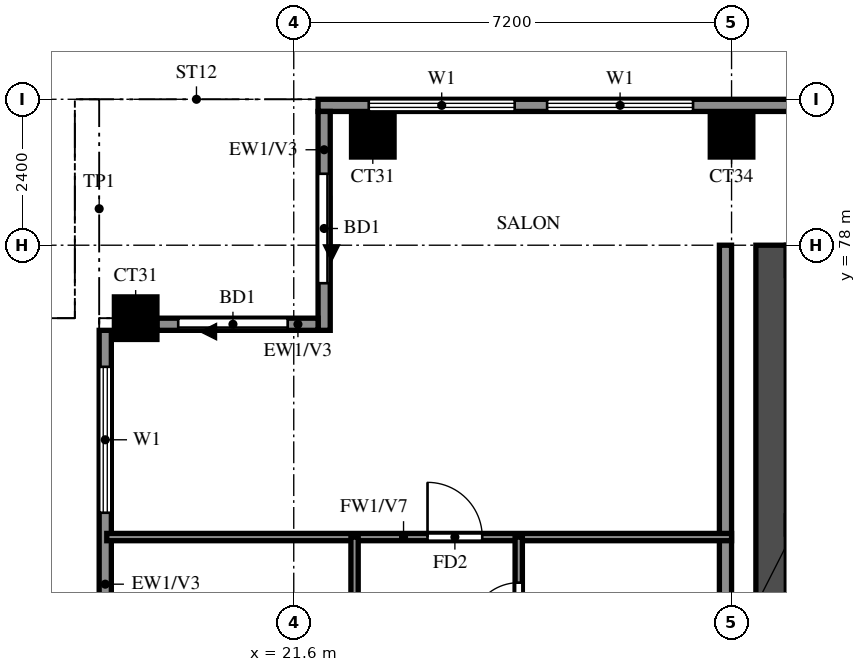
"""IFC4 building model, lengths in metres.
Left out: names, types, materials, properties, quantities, classifications, styles, units other than length and angle.
Written with IfcOpenShell. Run it as: python <this file> out.ifc"""

import sys

from ifc_helpers import new_model, si_unit, direction, frame, frame_2d, origin, origin_2d, place, context, subcontext, project, spatial, rectangle, extrude, source, transform, mapped, element, fill, save


model = new_model("IFC4")
c1 = context("Model", 3, precision=1e-05, world=origin(), true_north=direction((0.0, 1.0)))
c2 = subcontext(c1, "Body", "Model", "MODEL_VIEW")
j1 = project(units=[si_unit("LENGTHUNIT", "METRE"), si_unit("PLANEANGLEUNIT", "RADIAN")], contexts=[c1])
p1 = place(None, origin())
s1 = spatial("IfcSite", under=j1, at=p1, CompositionType="ELEMENT")
p2 = place(p1, origin())
s2 = spatial("IfcBuilding", under=s1, at=p2, CompositionType="ELEMENT")
p3 = place(p2, frame((0.0, 0.0, 211.5)))
s3 = spatial("IfcBuildingStorey", under=s2, at=p3, CompositionType="ELEMENT", Elevation=211.5)
m1 = source(origin(), c2, "Body", "SweptSolid", [
    extrude(rectangle(XDim=0.7, YDim=0.7, at=origin_2d()), origin(), (0.0, 0.0, 1.0), 3.5),
])
for number, where, z_axis, x_axis in (
    (1, (19.0, 76.8, -0.28), (0.0, 0.0, 1.0), (1.0, 0.0, 0.0)),
    (2, (22.9, 79.8, -0.28), (0.0, 0.0, 1.0), (1.0, 0.0, 0.0)),
):
    element("IfcColumn", number, at=place(p3, frame(where, z_axis=z_axis, x_axis=x_axis)), inside=s3, PredefinedType="COLUMN", context=c2, shape_type="MappedRepresentation", body=[
        mapped(m1, transform((0.0, 0.0, 0.0))),
    ])
m2 = source(origin(), c2, "Body", "SweptSolid", [
    extrude(rectangle(XDim=0.7, YDim=0.7, at=origin_2d()), origin(), (0.0, 0.0, 1.0), 3.22),
])
p4 = place(p3, frame((28.8, 79.8, 0.0), z_axis=(0.0, 0.0, 1.0), x_axis=(1.0, 0.0, 0.0)))
e3 = element("IfcColumn", 3, at=p4, inside=s3, PredefinedType="COLUMN", context=c2, shape_type="MappedRepresentation", body=[
    mapped(m2, transform((0.0, 0.0, 0.0))),
])
p5 = place(p3, frame((29.45, 66.15, 0.0), z_axis=(0.0, 0.0, 1.0), x_axis=(0.0, 1.0, 0.0)))
e4 = element("IfcWall", 4, at=p5, inside=s3, PredefinedType="SHEAR", context=c2, shape_type="SweptSolid", body=[
    extrude(rectangle(XDim=11.85, YDim=0.5, at=frame_2d((5.925, 0.0))), origin(), (0.0, 0.0, 1.0), 3.22),
])
p6 = place(p3, frame((78.6, 80.3, 0.0), z_axis=(0.0, 0.0, 1.0), x_axis=(-1.0, 0.0, 0.0)))
e5 = element("IfcWall", 5, at=p6, inside=s3, PredefinedType="SOLIDWALL", context=c2, shape_type="SweptSolid", body=[
    extrude(rectangle(XDim=56.6, YDim=0.2, at=frame_2d((28.3, 0.0))), origin(), (0.0, 0.0, 1.0), 3.22),
])
p7 = place(p6, frame((50.433, 0.0, 0.6)))
e6 = element("IfcOpeningElement", 6, at=p7, cuts=e5, PredefinedType="OPENING", context=c2, shape_type="SweptSolid", body=[
    extrude(rectangle(XDim=2.4, YDim=2.4, at=frame_2d((1.2, 1.2))), frame((0.0, 0.11, 0.0), z_axis=(0.0, -1.0, 0.0), x_axis=(1.0, 0.0, 0.0)), (0.0, 0.0, 1.0), 0.22),
])
p8 = place(p6, frame((53.367, 0.0, 0.6)))
e7 = element("IfcOpeningElement", 7, at=p8, cuts=e5, PredefinedType="OPENING", context=c2, shape_type="SweptSolid", body=[
    extrude(rectangle(XDim=2.4, YDim=2.4, at=frame_2d((1.2, 1.2))), frame((0.0, 0.11, 0.0), z_axis=(0.0, -1.0, 0.0), x_axis=(1.0, 0.0, 0.0)), (0.0, 0.0, 1.0), 0.22),
])
p9 = place(p6, frame((0.767, 0.0, 0.6)))
e8 = element("IfcOpeningElement", 8, at=p9, cuts=e5, PredefinedType="OPENING", context=c2, shape_type="SweptSolid", body=[
    extrude(rectangle(XDim=2.4, YDim=2.4, at=frame_2d((1.2, 1.2))), frame((0.0, 0.11, 0.0), z_axis=(0.0, -1.0, 0.0), x_axis=(1.0, 0.0, 0.0)), (0.0, 0.0, 1.0), 0.22),
])
p10 = place(p6, frame((3.633, 0.0, 0.6)))
e9 = element("IfcOpeningElement", 9, at=p10, cuts=e5, PredefinedType="OPENING", context=c2, shape_type="SweptSolid", body=[
    extrude(rectangle(XDim=2.4, YDim=2.4, at=frame_2d((1.2, 1.2))), frame((0.0, 0.11, 0.0), z_axis=(0.0, -1.0, 0.0), x_axis=(1.0, 0.0, 0.0)), (0.0, 0.0, 1.0), 0.22),
])
p11 = place(p3, frame((22.1, 80.2, 0.0), z_axis=(0.0, 0.0, 1.0), x_axis=(0.0, -1.0, 0.0)))
e10 = element("IfcWall", 10, at=p11, inside=s3, PredefinedType="SOLIDWALL", context=c2, shape_type="SweptSolid", body=[
    extrude(rectangle(XDim=3.6, YDim=0.2, at=frame_2d((1.8, 0.0))), origin(), (0.0, 0.0, 1.0), 3.22),
])
p12 = place(p11, frame((1.025, 0.0, 0.0)))
e11 = element("IfcOpeningElement", 11, at=p12, cuts=e10, PredefinedType="OPENING", context=c2, shape_type="SweptSolid", body=[
    extrude(rectangle(XDim=1.8, YDim=2.4, at=frame_2d((0.9, 1.2))), frame((0.0, 0.11, 0.0), z_axis=(0.0, -1.0, 0.0), x_axis=(1.0, 0.0, 0.0)), (0.0, 0.0, 1.0), 0.22),
])
p13 = place(p3, frame((22.0, 76.7, 0.0), z_axis=(0.0, 0.0, 1.0), x_axis=(-1.0, 0.0, 0.0)))
e12 = element("IfcWall", 12, at=p13, inside=s3, PredefinedType="SOLIDWALL", context=c2, shape_type="SweptSolid", body=[
    extrude(rectangle(XDim=2.65, YDim=0.2, at=frame_2d((1.325, 0.0))), origin(), (0.0, 0.0, 1.0), 3.22),
])
p14 = place(p13, frame((0.5, 0.0, 0.0)))
e13 = element("IfcOpeningElement", 13, at=p14, cuts=e12, PredefinedType="OPENING", context=c2, shape_type="SweptSolid", body=[
    extrude(rectangle(XDim=1.8, YDim=2.4, at=frame_2d((0.9, 1.2))), frame((0.0, 0.11, 0.0), z_axis=(0.0, -1.0, 0.0), x_axis=(1.0, 0.0, 0.0)), (0.0, 0.0, 1.0), 0.22),
])
p15 = place(p3, frame((18.5, 76.6, 0.0), z_axis=(0.0, 0.0, 1.0), x_axis=(0.0, -1.0, 0.0)))
e14 = element("IfcWall", 14, at=p15, inside=s3, PredefinedType="SOLIDWALL", context=c2, shape_type="SweptSolid", body=[
    extrude(rectangle(XDim=33.4, YDim=0.2, at=frame_2d((16.7, 0.0))), origin(), (0.0, 0.0, 1.0), 3.22),
])
p16 = place(p15, frame((30.037, 0.0, 0.0)))
e15 = element("IfcOpeningElement", 15, at=p16, cuts=e14, PredefinedType="OPENING", context=c2, shape_type="SweptSolid", body=[
    extrude(rectangle(XDim=1.8, YDim=2.4, at=frame_2d((0.9, 1.2))), frame((0.0, 0.11, 0.0), z_axis=(0.0, -1.0, 0.0), x_axis=(1.0, 0.0, 0.0)), (0.0, 0.0, 1.0), 0.22),
])
p17 = place(p15, frame((28.719, 0.0, 0.6)))
e16 = element("IfcOpeningElement", 16, at=p17, cuts=e14, PredefinedType="OPENING", context=c2, shape_type="SweptSolid", body=[
    extrude(rectangle(XDim=0.9, YDim=2.4, at=frame_2d((0.45, 1.2))), frame((0.0, 0.11, 0.0), z_axis=(0.0, -1.0, 0.0), x_axis=(1.0, 0.0, 0.0)), (0.0, 0.0, 1.0), 0.22),
])
p18 = place(p15, frame((25.6, 0.0, 0.6)))
e17 = element("IfcOpeningElement", 17, at=p18, cuts=e14, PredefinedType="OPENING", context=c2, shape_type="SweptSolid", body=[
    extrude(rectangle(XDim=2.4, YDim=2.4, at=frame_2d((1.2, 1.2))), frame((0.0, 0.11, 0.0), z_axis=(0.0, -1.0, 0.0), x_axis=(1.0, 0.0, 0.0)), (0.0, 0.0, 1.0), 0.22),
])
p19 = place(p15, frame((22.0, 0.0, 0.6)))
e18 = element("IfcOpeningElement", 18, at=p19, cuts=e14, PredefinedType="OPENING", context=c2, shape_type="SweptSolid", body=[
    extrude(rectangle(XDim=2.4, YDim=2.4, at=frame_2d((1.2, 1.2))), frame((0.0, 0.11, 0.0), z_axis=(0.0, -1.0, 0.0), x_axis=(1.0, 0.0, 0.0)), (0.0, 0.0, 1.0), 0.22),
])
p20 = place(p15, frame((18.4, 0.0, 0.6)))
e19 = element("IfcOpeningElement", 19, at=p20, cuts=e14, PredefinedType="OPENING", context=c2, shape_type="SweptSolid", body=[
    extrude(rectangle(XDim=2.4, YDim=2.4, at=frame_2d((1.2, 1.2))), frame((0.0, 0.11, 0.0), z_axis=(0.0, -1.0, 0.0), x_axis=(1.0, 0.0, 0.0)), (0.0, 0.0, 1.0), 0.22),
])
p21 = place(p15, frame((14.8, 0.0, 0.6)))
e20 = element("IfcOpeningElement", 20, at=p21, cuts=e14, PredefinedType="OPENING", context=c2, shape_type="SweptSolid", body=[
    extrude(rectangle(XDim=2.4, YDim=2.4, at=frame_2d((1.2, 1.2))), frame((0.0, 0.11, 0.0), z_axis=(0.0, -1.0, 0.0), x_axis=(1.0, 0.0, 0.0)), (0.0, 0.0, 1.0), 0.22),
])
p22 = place(p15, frame((7.833, 0.0, 0.6)))
e21 = element("IfcOpeningElement", 21, at=p22, cuts=e14, PredefinedType="OPENING", context=c2, shape_type="SweptSolid", body=[
    extrude(rectangle(XDim=2.4, YDim=2.4, at=frame_2d((1.2, 1.2))), frame((0.0, 0.11, 0.0), z_axis=(0.0, -1.0, 0.0), x_axis=(1.0, 0.0, 0.0)), (0.0, 0.0, 1.0), 0.22),
])
p23 = place(p15, frame((10.967, 0.0, 0.6)))
e22 = element("IfcOpeningElement", 22, at=p23, cuts=e14, PredefinedType="OPENING", context=c2, shape_type="SweptSolid", body=[
    extrude(rectangle(XDim=2.4, YDim=2.4, at=frame_2d((1.2, 1.2))), frame((0.0, 0.11, 0.0), z_axis=(0.0, -1.0, 0.0), x_axis=(1.0, 0.0, 0.0)), (0.0, 0.0, 1.0), 0.22),
])
p24 = place(p15, frame((4.75, 0.0, 1.5)))
e23 = element("IfcOpeningElement", 23, at=p24, cuts=e14, PredefinedType="OPENING", context=c2, shape_type="SweptSolid", body=[
    extrude(rectangle(XDim=0.9, YDim=0.9, at=frame_2d((0.45, 0.45))), frame((0.0, 0.11, 0.0), z_axis=(0.0, -1.0, 0.0), x_axis=(1.0, 0.0, 0.0)), (0.0, 0.0, 1.0), 0.22),
])
p25 = place(p15, frame((0.6, 0.0, 0.6)))
e24 = element("IfcOpeningElement", 24, at=p25, cuts=e14, PredefinedType="OPENING", context=c2, shape_type="SweptSolid", body=[
    extrude(rectangle(XDim=2.4, YDim=2.4, at=frame_2d((1.2, 1.2))), frame((0.0, 0.11, 0.0), z_axis=(0.0, -1.0, 0.0), x_axis=(1.0, 0.0, 0.0)), (0.0, 0.0, 1.0), 0.22),
])
p26 = place(p3, frame((28.7, 62.4, 0.0), z_axis=(0.0, 0.0, 1.0), x_axis=(0.0, 1.0, 0.0)))
e25 = element("IfcWall", 25, at=p26, inside=s3, PredefinedType="SOLIDWALL", context=c2, shape_type="SweptSolid", body=[
    extrude(rectangle(XDim=15.6, YDim=0.2, at=frame_2d((7.8, 0.0))), origin(), (0.0, 0.0, 1.0), 3.22),
])
p27 = place(p3, frame((18.525, 73.2, 0.0), z_axis=(0.0, 0.0, 1.0), x_axis=(1.0, 0.0, 0.0)))
e26 = element("IfcWall", 26, at=p27, inside=s3, PredefinedType="PARTITIONING", context=c2, shape_type="SweptSolid", body=[
    extrude(rectangle(XDim=10.275, YDim=0.12, at=frame_2d((5.138, 0.0))), origin(), (0.0, 0.0, 1.0), 2.32),
])
p28 = place(p27, frame((5.275, 0.0, 0.0)))
e27 = element("IfcOpeningElement", 27, at=p28, cuts=e26, PredefinedType="OPENING", context=c2, shape_type="SweptSolid", body=[
    extrude(rectangle(XDim=0.9, YDim=2.1, at=frame_2d((0.45, 1.05))), frame((0.0, 0.07, 0.0), z_axis=(0.0, -1.0, 0.0), x_axis=(1.0, 0.0, 0.0)), (0.0, 0.0, 1.0), 0.14),
])
p29 = place(p3, frame((22.6, 69.6, 0.0), z_axis=(0.0, 0.0, 1.0), x_axis=(0.0, 1.0, 0.0)))
e28 = element("IfcWall", 28, at=p29, inside=s3, PredefinedType="PARTITIONING", context=c2, shape_type="SweptSolid", body=[
    extrude(rectangle(XDim=3.6, YDim=0.12, at=frame_2d((1.8, 0.0))), origin(), (0.0, 0.0, 1.0), 3.22),
])
p30 = place(p3, frame((25.3, 61.2, 0.0), z_axis=(0.0, 0.0, 1.0), x_axis=(0.0, 1.0, 0.0)))
e29 = element("IfcWall", 29, at=p30, inside=s3, PredefinedType="PARTITIONING", context=c2, shape_type="SweptSolid", body=[
    extrude(rectangle(XDim=12.0, YDim=0.12, at=frame_2d((6.0, 0.0))), origin(), (0.0, 0.0, 1.0), 3.22),
])
p31 = place(p30, frame((4.2, 0.0, 0.0)))
e30 = element("IfcOpeningElement", 30, at=p31, cuts=e29, PredefinedType="OPENING", context=c2, shape_type="SweptSolid", body=[
    extrude(rectangle(XDim=0.9, YDim=2.1, at=frame_2d((0.45, 1.05))), frame((0.0, 0.07, 0.0), z_axis=(0.0, -1.0, 0.0), x_axis=(1.0, 0.0, 0.0)), (0.0, 0.0, 1.0), 0.14),
])
p32 = place(p30, frame((7.975, 0.0, 0.0)))
e31 = element("IfcOpeningElement", 31, at=p32, cuts=e29, PredefinedType="OPENING", context=c2, shape_type="SweptSolid", body=[
    extrude(rectangle(XDim=0.8, YDim=2.1, at=frame_2d((0.4, 1.05))), frame((0.0, 0.07, 0.0), z_axis=(0.0, -1.0, 0.0), x_axis=(1.0, 0.0, 0.0)), (0.0, 0.0, 1.0), 0.14),
])
p33 = place(p30, frame((10.45, 0.0, 0.0)))
e32 = element("IfcOpeningElement", 32, at=p33, cuts=e29, PredefinedType="OPENING", context=c2, shape_type="SweptSolid", body=[
    extrude(rectangle(XDim=0.8, YDim=2.1, at=frame_2d((0.4, 1.05))), frame((0.0, 0.07, 0.0), z_axis=(0.0, -1.0, 0.0), x_axis=(1.0, 0.0, 0.0)), (0.0, 0.0, 1.0), 0.14),
])
p34 = place(p7, origin())
e33 = element("IfcWindow", 33, at=p34, inside=s3, PartitioningType="DOUBLE_PANEL_VERTICAL", PredefinedType="WINDOW", context=c2, shape_type="SweptSolid", body=[
    extrude(rectangle(XDim=2.4, YDim=2.4, at=frame_2d((1.2, 1.2))), frame((0.0, 0.03, 0.0), z_axis=(0.0, -1.0, 0.0), x_axis=(1.0, 0.0, 0.0)), (0.0, 0.0, 1.0), 0.06),
])
fill(e6, e33)
p35 = place(p8, origin())
e34 = element("IfcWindow", 34, at=p35, inside=s3, PartitioningType="DOUBLE_PANEL_VERTICAL", PredefinedType="WINDOW", context=c2, shape_type="SweptSolid", body=[
    extrude(rectangle(XDim=2.4, YDim=2.4, at=frame_2d((1.2, 1.2))), frame((0.0, 0.03, 0.0), z_axis=(0.0, -1.0, 0.0), x_axis=(1.0, 0.0, 0.0)), (0.0, 0.0, 1.0), 0.06),
])
fill(e7, e34)
p36 = place(p12, origin())
e35 = element("IfcDoor", 35, at=p36, inside=s3, OperationType="DOUBLE_DOOR_SLIDING", PredefinedType="DOOR", context=c2, shape_type="SweptSolid", body=[
    extrude(rectangle(XDim=1.8, YDim=2.4, at=frame_2d((0.9, 1.2))), frame((0.0, 0.025, 0.0), z_axis=(0.0, -1.0, 0.0), x_axis=(1.0, 0.0, 0.0)), (0.0, 0.0, 1.0), 0.05),
])
fill(e11, e35)
p37 = place(p14, origin())
e36 = element("IfcDoor", 36, at=p37, inside=s3, OperationType="DOUBLE_DOOR_SLIDING", PredefinedType="DOOR", context=c2, shape_type="SweptSolid", body=[
    extrude(rectangle(XDim=1.8, YDim=2.4, at=frame_2d((0.9, 1.2))), frame((0.0, 0.025, 0.0), z_axis=(0.0, -1.0, 0.0), x_axis=(1.0, 0.0, 0.0)), (0.0, 0.0, 1.0), 0.05),
])
fill(e13, e36)
p38 = place(p25, origin())
e37 = element("IfcWindow", 37, at=p38, inside=s3, PartitioningType="DOUBLE_PANEL_VERTICAL", PredefinedType="WINDOW", context=c2, shape_type="SweptSolid", body=[
    extrude(rectangle(XDim=2.4, YDim=2.4, at=frame_2d((1.2, 1.2))), frame((0.0, 0.03, 0.0), z_axis=(0.0, -1.0, 0.0), x_axis=(1.0, 0.0, 0.0)), (0.0, 0.0, 1.0), 0.06),
])
fill(e24, e37)
p39 = place(p28, origin())
e38 = element("IfcDoor", 38, at=p39, inside=s3, OperationType="SINGLE_SWING_LEFT", PredefinedType="DOOR", context=c2, shape_type="SweptSolid", body=[
    extrude(rectangle(XDim=0.9, YDim=2.1, at=frame_2d((0.45, 1.05))), frame((0.0, 0.025, 0.0), z_axis=(0.0, -1.0, 0.0), x_axis=(1.0, 0.0, 0.0)), (0.0, 0.0, 1.0), 0.05),
])
fill(e27, e38)
p40 = place(p33, origin())
e39 = element("IfcDoor", 39, at=p40, inside=s3, OperationType="SINGLE_SWING_RIGHT", PredefinedType="DOOR", context=c2, shape_type="SweptSolid", body=[
    extrude(rectangle(XDim=0.8, YDim=2.1, at=frame_2d((0.4, 1.05))), frame((0.0, 0.025, 0.0), z_axis=(0.0, -1.0, 0.0), x_axis=(1.0, 0.0, 0.0)), (0.0, 0.0, 1.0), 0.05),
])
fill(e32, e39)
save(model, sys.argv[1])
